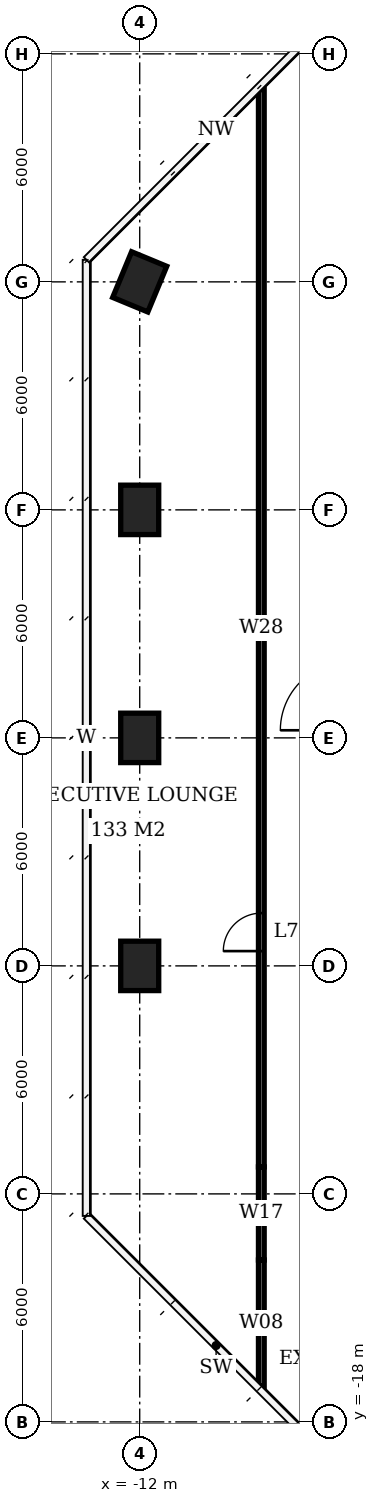
"""IFC4 building model, lengths in metres.
Left out: names, types, materials, properties, quantities, classifications, styles, units other than length and angle.
Written with IfcOpenShell. Run it as: python <this file> out.ifc"""

import sys

from ifc_helpers import new_model, si_unit, direction, frame, frame_2d, origin, origin_2d, place, context, subcontext, project, spatial, rectangle, extrude, element, fill, save


model = new_model("IFC4")
c1 = context("Model", 3, precision=1e-05, world=origin(), true_north=direction((0.0, 1.0)))
c2 = subcontext(c1, "Body", "Model", "MODEL_VIEW")
j1 = project(units=[si_unit("LENGTHUNIT", "METRE"), si_unit("PLANEANGLEUNIT", "RADIAN")], contexts=[c1])
p1 = place(None, origin())
s1 = spatial("IfcSite", under=j1, at=p1, CompositionType="ELEMENT")
p2 = place(p1, origin())
s2 = spatial("IfcBuilding", under=s1, at=p2, CompositionType="ELEMENT")
p3 = place(p2, frame((0.0, 0.0, 287.9)))
s3 = spatial("IfcBuildingStorey", under=s2, at=p3, CompositionType="ELEMENT", Elevation=287.9)
for number, where, z_axis, x_axis in (
    (1, (-12.0, -6.0, 0.0), (0.0, 0.0, 1.0), (0.0, 1.0, 0.0)),
    (2, (-12.0, 0.0, 0.0), (0.0, 0.0, 1.0), (0.0, 1.0, 0.0)),
    (3, (-12.0, 6.0, 0.0), (0.0, 0.0, 1.0), (0.0, 1.0, 0.0)),
    (4, (-12.0, 12.0, 0.0), (0.0, 0.0, 1.0), (0.383, 0.924, 0.0)),
):
    element("IfcColumn", number, at=place(p3, frame(where, z_axis=z_axis, x_axis=x_axis)), inside=s3, PredefinedType="COLUMN", context=c2, shape_type="SweptSolid", body=[
        extrude(rectangle(XDim=1.3, YDim=1.0, at=origin_2d()), origin(), (0.0, 0.0, 1.0), 3.9),
    ])
p4 = place(p3, frame((-8.8, -17.063, 0.0), z_axis=(0.0, 0.0, 1.0), x_axis=(0.0, 1.0, 0.0)))
e5 = element("IfcWall", 5, at=p4, inside=s3, PredefinedType="PARTITIONING", context=c2, shape_type="SweptSolid", body=[
    extrude(rectangle(XDim=3.323, YDim=0.15, at=frame_2d((1.662, 0.0))), origin(), (0.0, 0.0, 1.0), 3.65),
])
p5 = place(p3, frame((-8.8, -13.74, 0.0), z_axis=(0.0, 0.0, 1.0), x_axis=(0.0, 1.0, 0.0)))
e6 = element("IfcWall", 6, at=p5, inside=s3, PredefinedType="PARTITIONING", context=c2, shape_type="SweptSolid", body=[
    extrude(rectangle(XDim=2.45, YDim=0.15, at=frame_2d((1.225, 0.0))), origin(), (0.0, 0.0, 1.0), 2.65),
])
p6 = place(p3, frame((-8.8, -11.29, 0.0), z_axis=(0.0, 0.0, 1.0), x_axis=(0.0, 1.0, 0.0)))
e7 = element("IfcWall", 7, at=p6, inside=s3, PredefinedType="PARTITIONING", context=c2, shape_type="SweptSolid", body=[
    extrude(rectangle(XDim=28.353, YDim=0.15, at=frame_2d((14.177, 0.0))), origin(), (0.0, 0.0, 1.0), 3.65),
])
p7 = place(p6, frame((5.679, 0.0, 0.0)))
e8 = element("IfcOpeningElement", 8, at=p7, cuts=e7, PredefinedType="OPENING", context=c2, shape_type="SweptSolid", body=[
    extrude(rectangle(XDim=1.0, YDim=2.4, at=frame_2d((0.5, 1.2))), frame((0.0, 0.085, 0.0), z_axis=(0.0, -1.0, 0.0), x_axis=(1.0, 0.0, 0.0)), (0.0, 0.0, 1.0), 0.17),
])
p8 = place(p7, origin())
e9 = element("IfcDoor", 9, at=p8, inside=s3, OperationType="SINGLE_SWING_LEFT", PredefinedType="DOOR", context=c2, shape_type="SweptSolid", body=[
    extrude(rectangle(XDim=1.0, YDim=2.4, at=frame_2d((0.5, 1.2))), frame((0.0, 0.025, 0.0), z_axis=(0.0, -1.0, 0.0), x_axis=(1.0, 0.0, 0.0)), (0.0, 0.0, 1.0), 0.05),
])
fill(e8, e9)
save(model, sys.argv[1])
